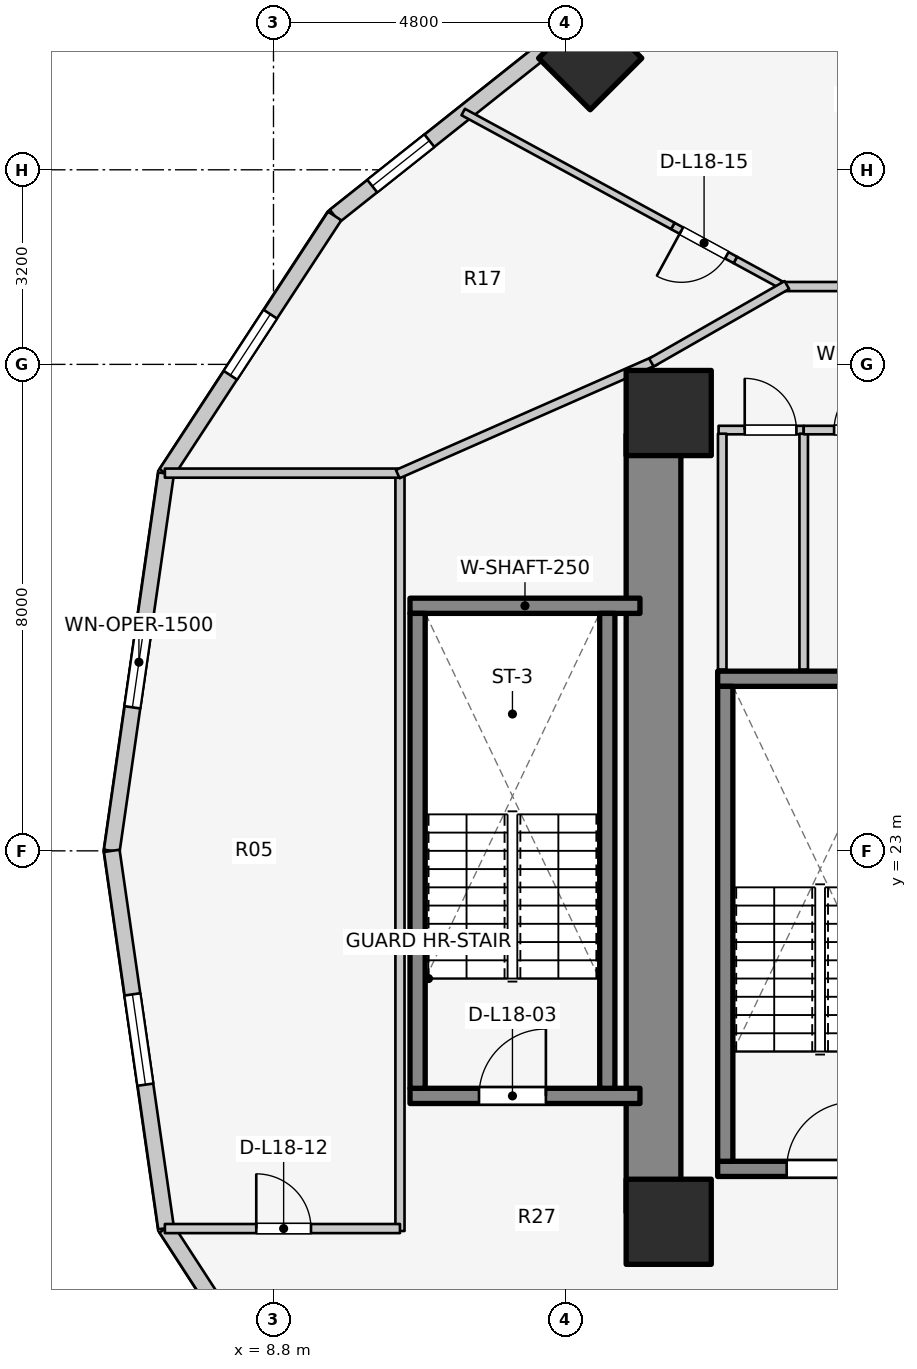
"""IFC4 building model, lengths in metres.
Left out: names, types, materials, properties, quantities, classifications, styles, units other than length and angle.
Written with IfcOpenShell. Run it as: python <this file> out.ifc"""

import sys

from ifc_helpers import new_model, si_unit, direction, frame, frame_2d, origin, origin_2d, place, context, subcontext, project, spatial, rectangle, extrude, element, fill, save


model = new_model("IFC4")
c1 = context("Model", 3, precision=1e-05, world=origin(), true_north=direction((0.0, 1.0)))
c2 = subcontext(c1, "Body", "Model", "MODEL_VIEW")
j1 = project(units=[si_unit("LENGTHUNIT", "METRE"), si_unit("PLANEANGLEUNIT", "RADIAN")], contexts=[c1])
p1 = place(None, origin())
s1 = spatial("IfcSite", under=j1, at=p1, CompositionType="ELEMENT")
p2 = place(p1, origin())
s2 = spatial("IfcBuilding", under=s1, at=p2, CompositionType="ELEMENT")
p3 = place(p2, frame((0.0, 0.0, 61.7)))
s3 = spatial("IfcBuildingStorey", under=s2, at=p3, CompositionType="ELEMENT", Elevation=61.7)
p4 = place(p3, frame((15.05, 17.05, 0.0), z_axis=(0.0, 0.0, 1.0), x_axis=(0.0, 1.0, 0.0)))
e1 = element("IfcWall", 1, at=p4, inside=s3, PredefinedType="SHEAR", context=c2, shape_type="SweptSolid", body=[
    extrude(rectangle(XDim=12.8, YDim=0.9, at=frame_2d((6.4, 0.0))), origin(), (0.0, 0.0, 1.0), 3.1),
])
p5 = place(p3, frame((16.105, 17.77, 0.0), z_axis=(0.0, 0.0, 1.0), x_axis=(1.0, 0.0, 0.0)))
e2 = element("IfcWall", 2, at=p5, inside=s3, PredefinedType="SOLIDWALL", context=c2, shape_type="SweptSolid", body=[
    extrude(rectangle(XDim=3.37, YDim=0.25, at=frame_2d((1.685, 0.0))), origin(), (0.0, 0.0, 1.0), 3.1),
])
p6 = place(p5, frame((1.135, 0.0, 0.0)))
e3 = element("IfcOpeningElement", 3, at=p6, cuts=e2, PredefinedType="OPENING", context=c2, shape_type="SweptSolid", body=[
    extrude(rectangle(XDim=1.1, YDim=2.1, at=frame_2d((0.55, 1.05))), frame((0.0, 0.135, 0.0), z_axis=(0.0, -1.0, 0.0), x_axis=(1.0, 0.0, 0.0)), (0.0, 0.0, 1.0), 0.27),
])
p7 = place(p3, frame((16.105, 25.83, 0.0), z_axis=(0.0, 0.0, 1.0), x_axis=(1.0, 0.0, 0.0)))
e4 = element("IfcWall", 4, at=p7, inside=s3, PredefinedType="SOLIDWALL", context=c2, shape_type="SweptSolid", body=[
    extrude(rectangle(XDim=3.37, YDim=0.25, at=frame_2d((1.685, 0.0))), origin(), (0.0, 0.0, 1.0), 3.1),
])
p8 = place(p3, frame((16.23, 17.895, 0.0), z_axis=(0.0, 0.0, 1.0), x_axis=(0.0, 1.0, 0.0)))
e5 = element("IfcWall", 5, at=p8, inside=s3, PredefinedType="SOLIDWALL", context=c2, shape_type="SweptSolid", body=[
    extrude(rectangle(XDim=7.81, YDim=0.25, at=frame_2d((3.905, 0.0))), origin(), (0.0, 0.0, 1.0), 3.1),
])
p9 = place(p3, frame((11.045, 18.97, 0.0), z_axis=(0.0, 0.0, 1.0), x_axis=(1.0, 0.0, 0.0)))
e6 = element("IfcWall", 6, at=p9, inside=s3, PredefinedType="SOLIDWALL", context=c2, shape_type="SweptSolid", body=[
    extrude(rectangle(XDim=3.782, YDim=0.25, at=frame_2d((1.891, 0.0))), origin(), (0.0, 0.0, 1.0), 3.1),
])
p10 = place(p9, frame((1.135, 0.0, 0.0)))
e7 = element("IfcOpeningElement", 7, at=p10, cuts=e6, PredefinedType="OPENING", context=c2, shape_type="SweptSolid", body=[
    extrude(rectangle(XDim=1.1, YDim=2.1, at=frame_2d((0.55, 1.05))), frame((0.0, 0.135, 0.0), z_axis=(0.0, -1.0, 0.0), x_axis=(1.0, 0.0, 0.0)), (0.0, 0.0, 1.0), 0.27),
])
p11 = place(p3, frame((11.045, 27.03, 0.0), z_axis=(0.0, 0.0, 1.0), x_axis=(1.0, 0.0, 0.0)))
e8 = element("IfcWall", 8, at=p11, inside=s3, PredefinedType="SOLIDWALL", context=c2, shape_type="SweptSolid", body=[
    extrude(rectangle(XDim=3.782, YDim=0.25, at=frame_2d((1.891, 0.0))), origin(), (0.0, 0.0, 1.0), 3.1),
])
for number, where, z_axis, x_axis in (
    (9, (11.17, 19.095, 0.0), (0.0, 0.0, 1.0), (0.0, 1.0, 0.0)),
    (10, (14.29, 19.095, 0.0), (0.0, 0.0, 1.0), (0.0, 1.0, 0.0)),
):
    element("IfcWall", number, at=place(p3, frame(where, z_axis=z_axis, x_axis=x_axis)), inside=s3, PredefinedType="SOLIDWALL", context=c2, shape_type="SweptSolid", body=[
        extrude(rectangle(XDim=7.81, YDim=0.25, at=frame_2d((3.905, 0.0))), origin(), (0.0, 0.0, 1.0), 3.1),
    ])
for number, where, z_axis, x_axis in (
    (11, (15.3, 16.9, 0.0), (0.0, 0.0, 1.0), (1.0, 0.0, 0.0)),
    (12, (15.3, 30.2, 0.0), (0.0, 0.0, 1.0), (1.0, 0.0, 0.0)),
):
    element("IfcColumn", number, at=place(p3, frame(where, z_axis=z_axis, x_axis=x_axis)), inside=s3, PredefinedType="COLUMN", context=c2, shape_type="SweptSolid", body=[
        extrude(rectangle(XDim=1.4, YDim=1.4, at=origin_2d()), origin(), (0.0, 0.0, 1.0), 3.1),
    ])
p12 = place(p3, frame((14.008, 36.035, 0.0), z_axis=(0.0, 0.0, 1.0), x_axis=(-0.707106781187, 0.707106781187, 0.0)))
e13 = element("IfcColumn", 13, at=p12, inside=s3, PredefinedType="COLUMN", context=c2, shape_type="SweptSolid", body=[
    extrude(rectangle(XDim=1.2, YDim=1.2, at=origin_2d()), origin(), (0.0, 0.0, 1.0), 3.1),
])
p13 = place(p3, frame((13.595, 36.45, 0.0), z_axis=(0.0, 0.0, 1.0), x_axis=(-0.783123133379, -0.621866672179, 0.0)))
e14 = element("IfcWall", 14, at=p13, inside=s3, PredefinedType="STANDARD", context=c2, shape_type="SweptSolid", body=[
    extrude(rectangle(XDim=4.839, YDim=0.26, at=frame_2d((2.419, 0.0))), origin(), (0.0, 0.0, 1.0), 1.22),
])
p14 = place(p13, frame((2.849, 0.0, 0.15)))
e15 = element("IfcOpeningElement", 15, at=p14, cuts=e14, PredefinedType="OPENING", context=c2, shape_type="SweptSolid", body=[
    extrude(rectangle(XDim=1.2, YDim=0.9, at=frame_2d((0.6, 0.45))), frame((0.0, 0.14, 0.0), z_axis=(0.0, -1.0, 0.0), x_axis=(1.0, 0.0, 0.0)), (0.0, 0.0, 1.0), 0.28),
])
p15 = place(p3, frame((9.806, 33.441, 0.0), z_axis=(0.0, 0.0, 1.0), x_axis=(-0.547702757047, -0.836672988642, 0.0)))
e16 = element("IfcWall", 16, at=p15, inside=s3, PredefinedType="STANDARD", context=c2, shape_type="SweptSolid", body=[
    extrude(rectangle(XDim=5.062, YDim=0.26, at=frame_2d((2.531, 0.0))), origin(), (0.0, 0.0, 1.0), 1.22),
])
p16 = place(p15, frame((1.931, 0.0, 0.15)))
e17 = element("IfcOpeningElement", 17, at=p16, cuts=e16, PredefinedType="OPENING", context=c2, shape_type="SweptSolid", body=[
    extrude(rectangle(XDim=1.2, YDim=0.9, at=frame_2d((0.6, 0.45))), frame((0.0, 0.14, 0.0), z_axis=(0.0, -1.0, 0.0), x_axis=(1.0, 0.0, 0.0)), (0.0, 0.0, 1.0), 0.28),
])
p17 = place(p3, frame((7.033, 29.205, 0.0), z_axis=(0.0, 0.0, 1.0), x_axis=(-0.142528001686, -0.989790770181, 0.0)))
e18 = element("IfcWall", 18, at=p17, inside=s3, PredefinedType="STANDARD", context=c2, shape_type="SweptSolid", body=[
    extrude(rectangle(XDim=6.269, YDim=0.26, at=frame_2d((3.135, 0.0))), origin(), (0.0, 0.0, 1.0), 2.57),
])
p18 = place(p17, frame((2.385, 0.0, 0.75)))
e19 = element("IfcOpeningElement", 19, at=p18, cuts=e18, PredefinedType="OPENING", context=c2, shape_type="SweptSolid", body=[
    extrude(rectangle(XDim=1.5, YDim=1.6, at=frame_2d((0.75, 0.8))), frame((0.0, 0.14, 0.0), z_axis=(0.0, -1.0, 0.0), x_axis=(1.0, 0.0, 0.0)), (0.0, 0.0, 1.0), 0.28),
])
p19 = place(p3, frame((6.14, 23.0, 0.0), z_axis=(0.0, 0.0, 1.0), x_axis=(0.142528001686, -0.989790770181, 0.0)))
e20 = element("IfcWall", 20, at=p19, inside=s3, PredefinedType="STANDARD", context=c2, shape_type="SweptSolid", body=[
    extrude(rectangle(XDim=6.269, YDim=0.26, at=frame_2d((3.135, 0.0))), origin(), (0.0, 0.0, 1.0), 2.57),
])
p20 = place(p19, frame((2.385, 0.0, 0.75)))
e21 = element("IfcOpeningElement", 21, at=p20, cuts=e20, PredefinedType="OPENING", context=c2, shape_type="SweptSolid", body=[
    extrude(rectangle(XDim=1.5, YDim=1.6, at=frame_2d((0.75, 0.8))), frame((0.0, 0.14, 0.0), z_axis=(0.0, -1.0, 0.0), x_axis=(1.0, 0.0, 0.0)), (0.0, 0.0, 1.0), 0.28),
])
p21 = place(p3, frame((7.033, 16.795, 0.0), z_axis=(0.0, 0.0, 1.0), x_axis=(0.544578722263, -0.838709732421, 0.0)))
e22 = element("IfcWall", 22, at=p21, inside=s3, PredefinedType="STANDARD", context=c2, shape_type="SweptSolid", body=[
    extrude(rectangle(XDim=5.092, YDim=0.26, at=frame_2d((2.546, 0.0))), origin(), (0.0, 0.0, 1.0), 1.22),
])
p22 = place(p21, frame((1.946, 0.0, 0.15)))
e23 = element("IfcOpeningElement", 23, at=p22, cuts=e22, PredefinedType="OPENING", context=c2, shape_type="SweptSolid", body=[
    extrude(rectangle(XDim=1.2, YDim=0.9, at=frame_2d((0.6, 0.45))), frame((0.0, 0.14, 0.0), z_axis=(0.0, -1.0, 0.0), x_axis=(1.0, 0.0, 0.0)), (0.0, 0.0, 1.0), 0.28),
])
p23 = place(p3, frame((16.12, 29.92, 0.0), z_axis=(0.0, 0.0, 1.0), x_axis=(1.0, 0.0, 0.0)))
e24 = element("IfcWall", 24, at=p23, inside=s3, PredefinedType="PLUMBINGWALL", context=c2, shape_type="SweptSolid", body=[
    extrude(rectangle(XDim=1.4, YDim=0.14, at=frame_2d((0.7, 0.0))), origin(), (0.0, 0.0, 1.0), 2.575),
])
p24 = place(p23, frame((0.43, 0.0, 0.0)))
e25 = element("IfcOpeningElement", 25, at=p24, cuts=e24, PredefinedType="OPENING", context=c2, shape_type="SweptSolid", body=[
    extrude(rectangle(XDim=0.85, YDim=2.05, at=frame_2d((0.425, 1.025))), frame((0.0, 0.08, 0.0), z_axis=(0.0, -1.0, 0.0), x_axis=(1.0, 0.0, 0.0)), (0.0, 0.0, 1.0), 0.16),
])
for number, where, z_axis, x_axis in (
    (26, (16.18, 25.98, 0.0), (0.0, 0.0, 1.0), (0.0, 1.0, 0.0)),
    (27, (17.52, 25.98, 0.0), (0.0, 0.0, 1.0), (0.0, 1.0, 0.0)),
):
    element("IfcWall", number, at=place(p3, frame(where, z_axis=z_axis, x_axis=x_axis)), inside=s3, PredefinedType="PLUMBINGWALL", context=c2, shape_type="SweptSolid", body=[
        extrude(rectangle(XDim=3.88, YDim=0.14, at=frame_2d((1.94, 0.0))), origin(), (0.0, 0.0, 1.0), 2.575),
    ])
p25 = place(p3, frame((17.52, 29.92, 0.0), z_axis=(0.0, 0.0, 1.0), x_axis=(1.0, 0.0, 0.0)))
e28 = element("IfcWall", 28, at=p25, inside=s3, PredefinedType="PLUMBINGWALL", context=c2, shape_type="SweptSolid", body=[
    extrude(rectangle(XDim=1.9, YDim=0.14, at=frame_2d((0.95, 0.0))), origin(), (0.0, 0.0, 1.0), 2.575),
])
p26 = place(p25, frame((0.5, 0.0, 0.0)))
e29 = element("IfcOpeningElement", 29, at=p26, cuts=e28, PredefinedType="OPENING", context=c2, shape_type="SweptSolid", body=[
    extrude(rectangle(XDim=0.85, YDim=2.05, at=frame_2d((0.425, 1.025))), frame((0.0, 0.08, 0.0), z_axis=(0.0, -1.0, 0.0), x_axis=(1.0, 0.0, 0.0)), (0.0, 0.0, 1.0), 0.16),
])
p27 = place(p3, frame((10.88, 16.748, 0.0), z_axis=(0.0, 0.0, 1.0), x_axis=(0.0, 1.0, 0.0)))
e30 = element("IfcWall", 30, at=p27, inside=s3, PredefinedType="PARTITIONING", context=c2, shape_type="SweptSolid", body=[
    extrude(rectangle(XDim=12.503, YDim=0.15, at=frame_2d((6.252, 0.0))), origin(), (0.0, 0.0, 1.0), 2.12),
])
p28 = place(p3, frame((7.014, 16.788, 0.0), z_axis=(0.0, 0.0, 1.0), x_axis=(1.0, 0.0, 0.0)))
e31 = element("IfcWall", 31, at=p28, inside=s3, PredefinedType="PARTITIONING", context=c2, shape_type="SweptSolid", body=[
    extrude(rectangle(XDim=3.866, YDim=0.15, at=frame_2d((1.933, 0.0))), origin(), (0.0, 0.0, 1.0), 2.575),
])
p29 = place(p28, frame((1.503, 0.0, 0.0)))
e32 = element("IfcOpeningElement", 32, at=p29, cuts=e31, PredefinedType="OPENING", context=c2, shape_type="SweptSolid", body=[
    extrude(rectangle(XDim=0.9, YDim=2.1, at=frame_2d((0.45, 1.05))), frame((0.0, 0.085, 0.0), z_axis=(0.0, -1.0, 0.0), x_axis=(1.0, 0.0, 0.0)), (0.0, 0.0, 1.0), 0.17),
])
p30 = place(p3, frame((7.014, 29.212, 0.0), z_axis=(0.0, 0.0, 1.0), x_axis=(1.0, 0.0, 0.0)))
e33 = element("IfcWall", 33, at=p30, inside=s3, PredefinedType="PARTITIONING", context=c2, shape_type="SweptSolid", body=[
    extrude(rectangle(XDim=3.866, YDim=0.15, at=frame_2d((1.933, 0.0))), origin(), (0.0, 0.0, 1.0), 2.575),
])
p31 = place(p3, frame((10.844, 29.196, 0.0), z_axis=(0.0, 0.0, 1.0), x_axis=(0.91502756289, 0.403391322604, 0.0)))
e34 = element("IfcWall", 34, at=p31, inside=s3, PredefinedType="PARTITIONING", context=c2, shape_type="SweptSolid", body=[
    extrude(rectangle(XDim=4.637, YDim=0.15, at=frame_2d((2.319, 0.0))), origin(), (0.0, 0.0, 1.0), 1.22),
])
p32 = place(p3, frame((17.244, 32.256, 0.0), z_axis=(0.0, 0.0, 1.0), x_axis=(-0.878580692024, 0.477593935894, 0.0)))
e35 = element("IfcWall", 35, at=p32, inside=s3, PredefinedType="MOVABLE", context=c2, shape_type="SweptSolid", body=[
    extrude(rectangle(XDim=0.966, YDim=0.12, at=frame_2d((0.483, 0.0))), origin(), (0.0, 0.0, 1.0), 2.575),
])
p33 = place(p3, frame((16.396, 32.717, 0.0), z_axis=(0.0, 0.0, 1.0), x_axis=(-0.878540750178, 0.4776674055, 0.0)))
e36 = element("IfcWall", 36, at=p33, inside=s3, PredefinedType="MOVABLE", context=c2, shape_type="SweptSolid", body=[
    extrude(rectangle(XDim=1.17, YDim=0.12, at=frame_2d((0.585, 0.0))), origin(), (0.0, 0.0, 1.0), 2.11),
])
p34 = place(p33, frame((0.16, 0.0, 0.0)))
e37 = element("IfcOpeningElement", 37, at=p34, cuts=e36, PredefinedType="OPENING", context=c2, shape_type="SweptSolid", body=[
    extrude(rectangle(XDim=0.85, YDim=2.05, at=frame_2d((0.425, 1.025))), frame((0.0, 0.07, 0.0), z_axis=(0.0, -1.0, 0.0), x_axis=(1.0, 0.0, 0.0)), (0.0, 0.0, 1.0), 0.14),
])
p35 = place(p3, frame((15.368, 33.276, 0.0), z_axis=(0.0, 0.0, 1.0), x_axis=(-0.878543913196, 0.477661587932, 0.0)))
e38 = element("IfcWall", 38, at=p35, inside=s3, PredefinedType="MOVABLE", context=c2, shape_type="SweptSolid", body=[
    extrude(rectangle(XDim=3.924, YDim=0.12, at=frame_2d((1.962, 0.0))), origin(), (0.0, 0.0, 1.0), 1.22),
])
p36 = place(p3, frame((17.15, 32.28, 0.0), z_axis=(0.0, 0.0, 1.0), x_axis=(1.0, 0.0, 0.0)))
e39 = element("IfcWall", 39, at=p36, inside=s3, PredefinedType="PARTITIONING", context=c2, shape_type="SweptSolid", body=[
    extrude(rectangle(XDim=1.14, YDim=0.15, at=frame_2d((0.57, 0.0))), origin(), (0.0, 0.0, 1.0), 2.575),
])
p37 = place(p3, frame((17.243, 32.305, 0.0), z_axis=(0.0, 0.0, 1.0), x_axis=(-0.867991349648, -0.496579315857, 0.0)))
e40 = element("IfcWall", 40, at=p37, inside=s3, PredefinedType="PARTITIONING", context=c2, shape_type="SweptSolid", body=[
    extrude(rectangle(XDim=2.567, YDim=0.15, at=frame_2d((1.283, 0.0))), origin(), (0.0, 0.0, 1.0), 1.22),
])
p38 = place(p14, origin())
e41 = element("IfcWindow", 41, at=p38, inside=s3, PartitioningType="SINGLE_PANEL", PredefinedType="WINDOW", context=c2, shape_type="SweptSolid", body=[
    extrude(rectangle(XDim=1.2, YDim=0.9, at=frame_2d((0.6, 0.45))), frame((0.0, 0.03, 0.0), z_axis=(0.0, -1.0, 0.0), x_axis=(1.0, 0.0, 0.0)), (0.0, 0.0, 1.0), 0.06),
])
fill(e15, e41)
p39 = place(p16, origin())
e42 = element("IfcWindow", 42, at=p39, inside=s3, PartitioningType="SINGLE_PANEL", PredefinedType="WINDOW", context=c2, shape_type="SweptSolid", body=[
    extrude(rectangle(XDim=1.2, YDim=0.9, at=frame_2d((0.6, 0.45))), frame((0.0, 0.03, 0.0), z_axis=(0.0, -1.0, 0.0), x_axis=(1.0, 0.0, 0.0)), (0.0, 0.0, 1.0), 0.06),
])
fill(e17, e42)
p40 = place(p18, origin())
e43 = element("IfcWindow", 43, at=p40, inside=s3, PartitioningType="SINGLE_PANEL", PredefinedType="WINDOW", context=c2, shape_type="SweptSolid", body=[
    extrude(rectangle(XDim=1.5, YDim=1.6, at=frame_2d((0.75, 0.8))), frame((0.0, 0.03, 0.0), z_axis=(0.0, -1.0, 0.0), x_axis=(1.0, 0.0, 0.0)), (0.0, 0.0, 1.0), 0.06),
])
fill(e19, e43)
p41 = place(p20, origin())
e44 = element("IfcWindow", 44, at=p41, inside=s3, PartitioningType="SINGLE_PANEL", PredefinedType="WINDOW", context=c2, shape_type="SweptSolid", body=[
    extrude(rectangle(XDim=1.5, YDim=1.6, at=frame_2d((0.75, 0.8))), frame((0.0, 0.03, 0.0), z_axis=(0.0, -1.0, 0.0), x_axis=(1.0, 0.0, 0.0)), (0.0, 0.0, 1.0), 0.06),
])
fill(e21, e44)
p42 = place(p6, origin())
e45 = element("IfcDoor", 45, at=p42, inside=s3, OperationType="SINGLE_SWING_RIGHT", PredefinedType="DOOR", context=c2, shape_type="SweptSolid", body=[
    extrude(rectangle(XDim=1.1, YDim=2.1, at=frame_2d((0.55, 1.05))), frame((0.0, 0.025, 0.0), z_axis=(0.0, -1.0, 0.0), x_axis=(1.0, 0.0, 0.0)), (0.0, 0.0, 1.0), 0.05),
])
fill(e3, e45)
p43 = place(p10, origin())
e46 = element("IfcDoor", 46, at=p43, inside=s3, OperationType="SINGLE_SWING_RIGHT", PredefinedType="DOOR", context=c2, shape_type="SweptSolid", body=[
    extrude(rectangle(XDim=1.1, YDim=2.1, at=frame_2d((0.55, 1.05))), frame((0.0, 0.025, 0.0), z_axis=(0.0, -1.0, 0.0), x_axis=(1.0, 0.0, 0.0)), (0.0, 0.0, 1.0), 0.05),
])
fill(e7, e46)
p44 = place(p24, origin())
e47 = element("IfcDoor", 47, at=p44, inside=s3, OperationType="SINGLE_SWING_LEFT", PredefinedType="DOOR", context=c2, shape_type="SweptSolid", body=[
    extrude(rectangle(XDim=0.85, YDim=2.05, at=frame_2d((0.425, 1.025))), frame((0.0, 0.025, 0.0), z_axis=(0.0, -1.0, 0.0), x_axis=(1.0, 0.0, 0.0)), (0.0, 0.0, 1.0), 0.05),
])
fill(e25, e47)
p45 = place(p26, origin())
e48 = element("IfcDoor", 48, at=p45, inside=s3, OperationType="SINGLE_SWING_RIGHT", PredefinedType="DOOR", context=c2, shape_type="SweptSolid", body=[
    extrude(rectangle(XDim=0.85, YDim=2.05, at=frame_2d((0.425, 1.025))), frame((0.0, 0.025, 0.0), z_axis=(0.0, -1.0, 0.0), x_axis=(1.0, 0.0, 0.0)), (0.0, 0.0, 1.0), 0.05),
])
fill(e29, e48)
p46 = place(p29, origin())
e49 = element("IfcDoor", 49, at=p46, inside=s3, OperationType="SINGLE_SWING_LEFT", PredefinedType="DOOR", context=c2, shape_type="SweptSolid", body=[
    extrude(rectangle(XDim=0.9, YDim=2.1, at=frame_2d((0.45, 1.05))), frame((0.0, 0.025, 0.0), z_axis=(0.0, -1.0, 0.0), x_axis=(1.0, 0.0, 0.0)), (0.0, 0.0, 1.0), 0.05),
])
fill(e32, e49)
p47 = place(p34, origin())
e50 = element("IfcDoor", 50, at=p47, inside=s3, OperationType="SINGLE_SWING_RIGHT", PredefinedType="DOOR", context=c2, shape_type="SweptSolid", body=[
    extrude(rectangle(XDim=0.85, YDim=2.05, at=frame_2d((0.425, 1.025))), frame((0.0, 0.025, 0.0), z_axis=(0.0, -1.0, 0.0), x_axis=(1.0, 0.0, 0.0)), (0.0, 0.0, 1.0), 0.05),
])
fill(e37, e50)
save(model, sys.argv[1])
